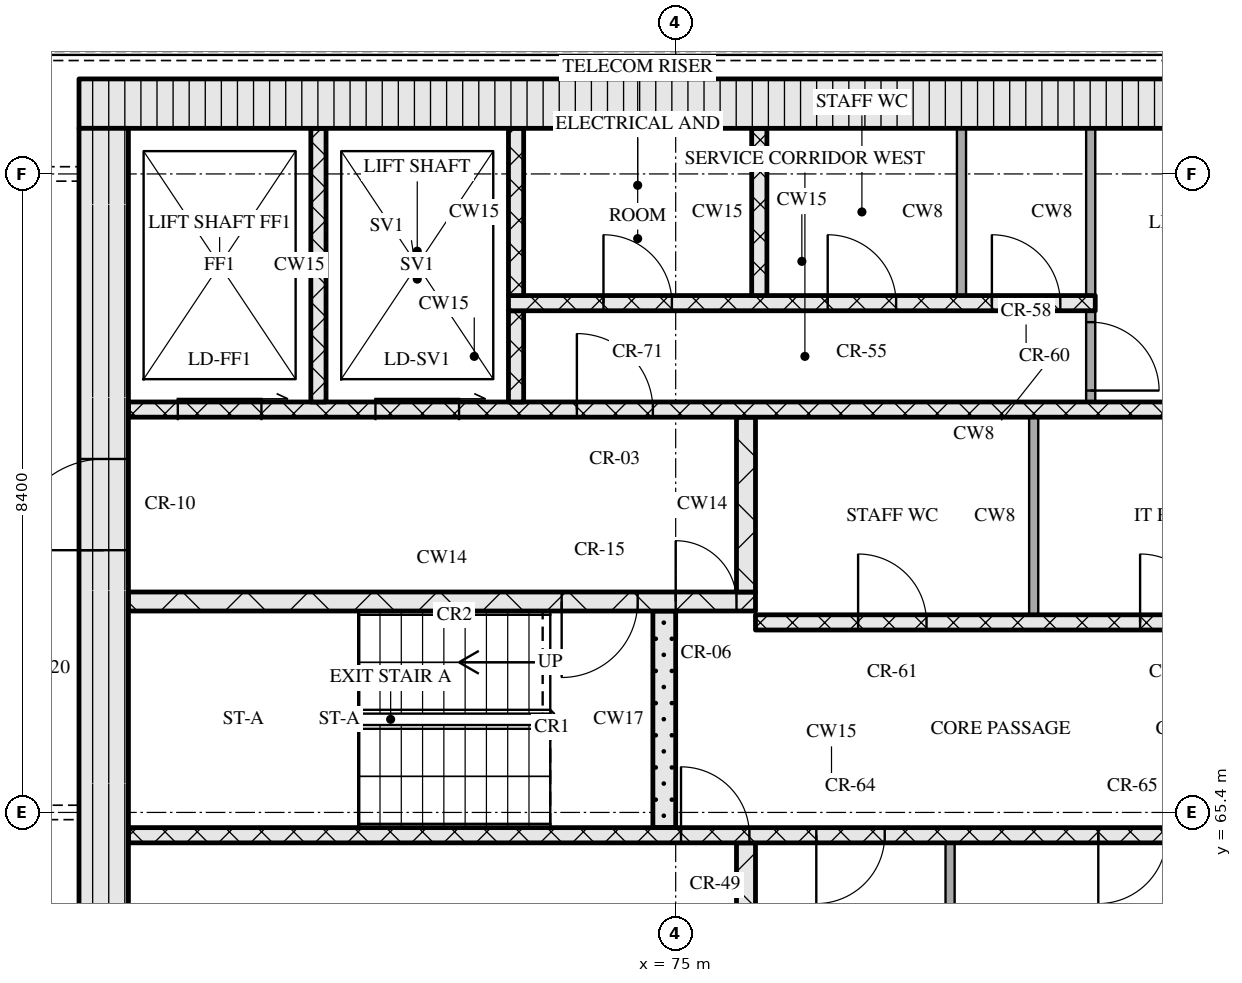
"""IFC4 building model, lengths in metres.
Left out: names, types, materials, properties, quantities, classifications, styles, units other than length and angle.
Written with IfcOpenShell. Run it as: python <this file> out.ifc"""

import sys

from ifc_helpers import new_model, si_unit, direction, frame, frame_2d, origin, place, context, subcontext, project, spatial, rectangle, extrude, element, fill, save


model = new_model("IFC4")
c1 = context("Model", 3, precision=1e-05, world=origin(), true_north=direction((0.0, 1.0)))
c2 = subcontext(c1, "Body", "Model", "MODEL_VIEW")
j1 = project(units=[si_unit("LENGTHUNIT", "METRE"), si_unit("PLANEANGLEUNIT", "RADIAN")], contexts=[c1])
p1 = place(None, origin())
s1 = spatial("IfcSite", under=j1, at=p1, CompositionType="ELEMENT")
p2 = place(p1, origin())
s2 = spatial("IfcBuilding", under=s1, at=p2, CompositionType="ELEMENT")
p3 = place(p2, frame((0.0, 0.0, 230.7)))
s3 = spatial("IfcBuildingStorey", under=s2, at=p3, CompositionType="ELEMENT", Elevation=230.7)
p4 = place(p3, frame((67.15, 74.725, 0.0), z_axis=(0.0, 0.0, 1.0), x_axis=(1.0, 0.0, 0.0)))
e1 = element("IfcWall", 1, at=p4, inside=s3, PredefinedType="SOLIDWALL", context=c2, shape_type="SweptSolid", body=[
    extrude(rectangle(XDim=40.9, YDim=0.65, at=frame_2d((20.45, 0.0))), origin(), (0.0, 0.0, 1.0), 3.32),
])
p5 = place(p3, frame((67.475, 62.4, 0.0), z_axis=(0.0, 0.0, 1.0), x_axis=(0.0, 1.0, 0.0)))
e2 = element("IfcWall", 2, at=p5, inside=s3, PredefinedType="SOLIDWALL", context=c2, shape_type="SweptSolid", body=[
    extrude(rectangle(XDim=12.0, YDim=0.65, at=frame_2d((6.0, 0.0))), origin(), (0.0, 0.0, 1.0), 3.32),
])
p6 = place(p5, frame((6.45, 0.0, 0.0)))
e3 = element("IfcOpeningElement", 3, at=p6, cuts=e2, PredefinedType="OPENING", context=c2, shape_type="SweptSolid", body=[
    extrude(rectangle(XDim=1.2, YDim=2.1, at=frame_2d((0.6, 1.05))), frame((0.0, 0.335, 0.0), z_axis=(0.0, -1.0, 0.0), x_axis=(1.0, 0.0, 0.0)), (0.0, 0.0, 1.0), 0.67),
])
p7 = place(p3, frame((75.925, 62.4, 0.0), z_axis=(0.0, 0.0, 1.0), x_axis=(0.0, 1.0, 0.0)))
e4 = element("IfcWall", 4, at=p7, inside=s3, PredefinedType="SOLIDWALL", context=c2, shape_type="SweptSolid", body=[
    extrude(rectangle(XDim=2.6, YDim=0.25, at=frame_2d((1.3, 0.0))), origin(), (0.0, 0.0, 1.0), 3.32),
])
p8 = place(p3, frame((78.61, 62.4, 0.0), z_axis=(0.0, 0.0, 1.0), x_axis=(0.0, 1.0, 0.0)))
e5 = element("IfcWall", 5, at=p8, inside=s3, PredefinedType="PARTITIONING", context=c2, shape_type="SweptSolid", body=[
    extrude(rectangle(XDim=2.6, YDim=0.12, at=frame_2d((1.3, 0.0))), origin(), (0.0, 0.0, 1.0), 3.32),
])
p9 = place(p3, frame((67.8, 65.1, 0.0), z_axis=(0.0, 0.0, 1.0), x_axis=(1.0, 0.0, 0.0)))
e6 = element("IfcWall", 6, at=p9, inside=s3, PredefinedType="SOLIDWALL", context=c2, shape_type="SweptSolid", body=[
    extrude(rectangle(XDim=18.5, YDim=0.2, at=frame_2d((9.25, 0.0))), origin(), (0.0, 0.0, 1.0), 3.32),
])
p10 = place(p9, frame((7.27, 0.0, 0.0)))
e7 = element("IfcOpeningElement", 7, at=p10, cuts=e6, PredefinedType="OPENING", context=c2, shape_type="SweptSolid", body=[
    extrude(rectangle(XDim=0.9, YDim=2.1, at=frame_2d((0.45, 1.05))), frame((0.0, 0.11, 0.0), z_axis=(0.0, -1.0, 0.0), x_axis=(1.0, 0.0, 0.0)), (0.0, 0.0, 1.0), 0.22),
])
p11 = place(p9, frame((9.05, 0.0, 0.0)))
e8 = element("IfcOpeningElement", 8, at=p11, cuts=e6, PredefinedType="OPENING", context=c2, shape_type="SweptSolid", body=[
    extrude(rectangle(XDim=0.9, YDim=2.1, at=frame_2d((0.45, 1.05))), frame((0.0, 0.11, 0.0), z_axis=(0.0, -1.0, 0.0), x_axis=(1.0, 0.0, 0.0)), (0.0, 0.0, 1.0), 0.22),
])
p12 = place(p9, frame((12.76, 0.0, 0.0)))
e9 = element("IfcOpeningElement", 9, at=p12, cuts=e6, PredefinedType="OPENING", context=c2, shape_type="SweptSolid", body=[
    extrude(rectangle(XDim=0.9, YDim=2.1, at=frame_2d((0.45, 1.05))), frame((0.0, 0.11, 0.0), z_axis=(0.0, -1.0, 0.0), x_axis=(1.0, 0.0, 0.0)), (0.0, 0.0, 1.0), 0.22),
])
p13 = place(p9, frame((16.7, 0.0, 0.0)))
e10 = element("IfcOpeningElement", 10, at=p13, cuts=e6, PredefinedType="OPENING", context=c2, shape_type="SweptSolid", body=[
    extrude(rectangle(XDim=0.9, YDim=2.1, at=frame_2d((0.45, 1.05))), frame((0.0, 0.11, 0.0), z_axis=(0.0, -1.0, 0.0), x_axis=(1.0, 0.0, 0.0)), (0.0, 0.0, 1.0), 0.22),
])
p14 = place(p3, frame((74.85, 65.2, 0.0), z_axis=(0.0, 0.0, 1.0), x_axis=(0.0, 1.0, 0.0)))
e11 = element("IfcWall", 11, at=p14, inside=s3, PredefinedType="SOLIDWALL", context=c2, shape_type="SweptSolid", body=[
    extrude(rectangle(XDim=2.85, YDim=0.3, at=frame_2d((1.425, 0.0))), origin(), (0.0, 0.0, 1.0), 3.32),
])
p15 = place(p3, frame((76.05, 67.9, 0.0), z_axis=(0.0, 0.0, 1.0), x_axis=(1.0, 0.0, 0.0)))
e12 = element("IfcWall", 12, at=p15, inside=s3, PredefinedType="SOLIDWALL", context=c2, shape_type="SweptSolid", body=[
    extrude(rectangle(XDim=23.1, YDim=0.2, at=frame_2d((11.55, 0.0))), origin(), (0.0, 0.0, 1.0), 3.32),
])
p16 = place(p15, frame((1.35, 0.0, 0.0)))
e13 = element("IfcOpeningElement", 13, at=p16, cuts=e12, PredefinedType="OPENING", context=c2, shape_type="SweptSolid", body=[
    extrude(rectangle(XDim=0.9, YDim=2.1, at=frame_2d((0.45, 1.05))), frame((0.0, 0.11, 0.0), z_axis=(0.0, -1.0, 0.0), x_axis=(1.0, 0.0, 0.0)), (0.0, 0.0, 1.0), 0.22),
])
p17 = place(p15, frame((5.06, 0.0, 0.0)))
e14 = element("IfcOpeningElement", 14, at=p17, cuts=e12, PredefinedType="OPENING", context=c2, shape_type="SweptSolid", body=[
    extrude(rectangle(XDim=0.9, YDim=2.1, at=frame_2d((0.45, 1.05))), frame((0.0, 0.11, 0.0), z_axis=(0.0, -1.0, 0.0), x_axis=(1.0, 0.0, 0.0)), (0.0, 0.0, 1.0), 0.22),
])
p18 = place(p15, frame((8.45, 0.0, 0.0)))
e15 = element("IfcOpeningElement", 15, at=p18, cuts=e12, PredefinedType="OPENING", context=c2, shape_type="SweptSolid", body=[
    extrude(rectangle(XDim=0.9, YDim=2.1, at=frame_2d((0.45, 1.05))), frame((0.0, 0.11, 0.0), z_axis=(0.0, -1.0, 0.0), x_axis=(1.0, 0.0, 0.0)), (0.0, 0.0, 1.0), 0.22),
])
p19 = place(p15, frame((10.91, 0.0, 0.0)))
e16 = element("IfcOpeningElement", 16, at=p19, cuts=e12, PredefinedType="OPENING", context=c2, shape_type="SweptSolid", body=[
    extrude(rectangle(XDim=0.9, YDim=2.1, at=frame_2d((0.45, 1.05))), frame((0.0, 0.11, 0.0), z_axis=(0.0, -1.0, 0.0), x_axis=(1.0, 0.0, 0.0)), (0.0, 0.0, 1.0), 0.22),
])
p20 = place(p15, frame((13.55, 0.0, 0.0)))
e17 = element("IfcOpeningElement", 17, at=p20, cuts=e12, PredefinedType="OPENING", context=c2, shape_type="SweptSolid", body=[
    extrude(rectangle(XDim=1.0, YDim=2.1, at=frame_2d((0.5, 1.05))), frame((0.0, 0.11, 0.0), z_axis=(0.0, -1.0, 0.0), x_axis=(1.0, 0.0, 0.0)), (0.0, 0.0, 1.0), 0.22),
])
p21 = place(p15, frame((16.2, 0.0, 0.0)))
e18 = element("IfcOpeningElement", 18, at=p21, cuts=e12, PredefinedType="OPENING", context=c2, shape_type="SweptSolid", body=[
    extrude(rectangle(XDim=1.1, YDim=2.1, at=frame_2d((0.55, 1.05))), frame((0.0, 0.11, 0.0), z_axis=(0.0, -1.0, 0.0), x_axis=(1.0, 0.0, 0.0)), (0.0, 0.0, 1.0), 0.22),
])
p22 = place(p15, frame((18.7, 0.0, 0.0)))
e19 = element("IfcOpeningElement", 19, at=p22, cuts=e12, PredefinedType="OPENING", context=c2, shape_type="SweptSolid", body=[
    extrude(rectangle(XDim=1.1, YDim=2.1, at=frame_2d((0.55, 1.05))), frame((0.0, 0.11, 0.0), z_axis=(0.0, -1.0, 0.0), x_axis=(1.0, 0.0, 0.0)), (0.0, 0.0, 1.0), 0.22),
])
p23 = place(p15, frame((21.2, 0.0, 0.0)))
e20 = element("IfcOpeningElement", 20, at=p23, cuts=e12, PredefinedType="OPENING", context=c2, shape_type="SweptSolid", body=[
    extrude(rectangle(XDim=1.1, YDim=2.1, at=frame_2d((0.55, 1.05))), frame((0.0, 0.11, 0.0), z_axis=(0.0, -1.0, 0.0), x_axis=(1.0, 0.0, 0.0)), (0.0, 0.0, 1.0), 0.22),
])
p24 = place(p3, frame((79.71, 68.0, 0.0), z_axis=(0.0, 0.0, 1.0), x_axis=(0.0, 1.0, 0.0)))
e21 = element("IfcWall", 21, at=p24, inside=s3, PredefinedType="PARTITIONING", context=c2, shape_type="SweptSolid", body=[
    extrude(rectangle(XDim=2.6, YDim=0.12, at=frame_2d((1.3, 0.0))), origin(), (0.0, 0.0, 1.0), 3.32),
])
p25 = place(p3, frame((67.8, 68.175, 0.0), z_axis=(0.0, 0.0, 1.0), x_axis=(1.0, 0.0, 0.0)))
e22 = element("IfcWall", 22, at=p25, inside=s3, PredefinedType="SOLIDWALL", context=c2, shape_type="SweptSolid", body=[
    extrude(rectangle(XDim=8.25, YDim=0.25, at=frame_2d((4.125, 0.0))), origin(), (0.0, 0.0, 1.0), 3.32),
])
p26 = place(p25, frame((5.7, 0.0, 0.0)))
e23 = element("IfcOpeningElement", 23, at=p26, cuts=e22, PredefinedType="OPENING", context=c2, shape_type="SweptSolid", body=[
    extrude(rectangle(XDim=1.0, YDim=2.1, at=frame_2d((0.5, 1.05))), frame((0.0, 0.135, 0.0), z_axis=(0.0, -1.0, 0.0), x_axis=(1.0, 0.0, 0.0)), (0.0, 0.0, 1.0), 0.27),
])
p27 = place(p25, frame((7.2, 0.0, 0.0)))
e24 = element("IfcOpeningElement", 24, at=p27, cuts=e22, PredefinedType="OPENING", context=c2, shape_type="SweptSolid", body=[
    extrude(rectangle(XDim=0.8, YDim=2.1, at=frame_2d((0.4, 1.05))), frame((0.0, 0.135, 0.0), z_axis=(0.0, -1.0, 0.0), x_axis=(1.0, 0.0, 0.0)), (0.0, 0.0, 1.0), 0.27),
])
p28 = place(p3, frame((75.925, 68.3, 0.0), z_axis=(0.0, 0.0, 1.0), x_axis=(0.0, 1.0, 0.0)))
e25 = element("IfcWall", 25, at=p28, inside=s3, PredefinedType="SOLIDWALL", context=c2, shape_type="SweptSolid", body=[
    extrude(rectangle(XDim=2.3, YDim=0.25, at=frame_2d((1.15, 0.0))), origin(), (0.0, 0.0, 1.0), 3.32),
])
p29 = place(p3, frame((67.8, 70.7, 0.0), z_axis=(0.0, 0.0, 1.0), x_axis=(1.0, 0.0, 0.0)))
e26 = element("IfcWall", 26, at=p29, inside=s3, PredefinedType="SOLIDWALL", context=c2, shape_type="SweptSolid", body=[
    extrude(rectangle(XDim=39.6, YDim=0.2, at=frame_2d((19.8, 0.0))), origin(), (0.0, 0.0, 1.0), 3.32),
])
p30 = place(p29, frame((0.65, 0.0, 0.0)))
e27 = element("IfcOpeningElement", 27, at=p30, cuts=e26, PredefinedType="OPENING", context=c2, shape_type="SweptSolid", body=[
    extrude(rectangle(XDim=1.1, YDim=2.1, at=frame_2d((0.55, 1.05))), frame((0.0, 0.11, 0.0), z_axis=(0.0, -1.0, 0.0), x_axis=(1.0, 0.0, 0.0)), (0.0, 0.0, 1.0), 0.22),
])
p31 = place(p29, frame((3.25, 0.0, 0.0)))
e28 = element("IfcOpeningElement", 28, at=p31, cuts=e26, PredefinedType="OPENING", context=c2, shape_type="SweptSolid", body=[
    extrude(rectangle(XDim=1.1, YDim=2.1, at=frame_2d((0.55, 1.05))), frame((0.0, 0.11, 0.0), z_axis=(0.0, -1.0, 0.0), x_axis=(1.0, 0.0, 0.0)), (0.0, 0.0, 1.0), 0.22),
])
p32 = place(p29, frame((5.9, 0.0, 0.0)))
e29 = element("IfcOpeningElement", 29, at=p32, cuts=e26, PredefinedType="OPENING", context=c2, shape_type="SweptSolid", body=[
    extrude(rectangle(XDim=1.0, YDim=2.1, at=frame_2d((0.5, 1.05))), frame((0.0, 0.11, 0.0), z_axis=(0.0, -1.0, 0.0), x_axis=(1.0, 0.0, 0.0)), (0.0, 0.0, 1.0), 0.22),
])
p33 = place(p29, frame((21.7, 0.0, 0.0)))
e30 = element("IfcOpeningElement", 30, at=p33, cuts=e26, PredefinedType="OPENING", context=c2, shape_type="SweptSolid", body=[
    extrude(rectangle(XDim=1.0, YDim=2.1, at=frame_2d((0.5, 1.05))), frame((0.0, 0.11, 0.0), z_axis=(0.0, -1.0, 0.0), x_axis=(1.0, 0.0, 0.0)), (0.0, 0.0, 1.0), 0.22),
])
p34 = place(p29, frame((32.7, 0.0, 0.0)))
e31 = element("IfcOpeningElement", 31, at=p34, cuts=e26, PredefinedType="OPENING", context=c2, shape_type="SweptSolid", body=[
    extrude(rectangle(XDim=1.0, YDim=2.1, at=frame_2d((0.5, 1.05))), frame((0.0, 0.11, 0.0), z_axis=(0.0, -1.0, 0.0), x_axis=(1.0, 0.0, 0.0)), (0.0, 0.0, 1.0), 0.22),
])
p35 = place(p29, frame((35.25, 0.0, 0.0)))
e32 = element("IfcOpeningElement", 32, at=p35, cuts=e26, PredefinedType="OPENING", context=c2, shape_type="SweptSolid", body=[
    extrude(rectangle(XDim=1.1, YDim=2.1, at=frame_2d((0.55, 1.05))), frame((0.0, 0.11, 0.0), z_axis=(0.0, -1.0, 0.0), x_axis=(1.0, 0.0, 0.0)), (0.0, 0.0, 1.0), 0.22),
])
p36 = place(p29, frame((37.85, 0.0, 0.0)))
e33 = element("IfcOpeningElement", 33, at=p36, cuts=e26, PredefinedType="OPENING", context=c2, shape_type="SweptSolid", body=[
    extrude(rectangle(XDim=1.1, YDim=2.1, at=frame_2d((0.55, 1.05))), frame((0.0, 0.11, 0.0), z_axis=(0.0, -1.0, 0.0), x_axis=(1.0, 0.0, 0.0)), (0.0, 0.0, 1.0), 0.22),
])
p37 = place(p3, frame((70.3, 70.8, 0.0), z_axis=(0.0, 0.0, 1.0), x_axis=(0.0, 1.0, 0.0)))
e34 = element("IfcWall", 34, at=p37, inside=s3, PredefinedType="SOLIDWALL", context=c2, shape_type="SweptSolid", body=[
    extrude(rectangle(XDim=3.6, YDim=0.2, at=frame_2d((1.8, 0.0))), origin(), (0.0, 0.0, 1.0), 3.32),
])
p38 = place(p3, frame((72.9, 70.8, 0.0), z_axis=(0.0, 0.0, 1.0), x_axis=(0.0, 1.0, 0.0)))
e35 = element("IfcWall", 35, at=p38, inside=s3, PredefinedType="SOLIDWALL", context=c2, shape_type="SweptSolid", body=[
    extrude(rectangle(XDim=1.2, YDim=0.2, at=frame_2d((0.6, 0.0))), origin(), (0.0, 0.0, 1.0), 3.32),
])
p39 = place(p3, frame((80.46, 70.8, 0.0), z_axis=(0.0, 0.0, 1.0), x_axis=(0.0, 1.0, 0.0)))
e36 = element("IfcWall", 36, at=p39, inside=s3, PredefinedType="PARTITIONING", context=c2, shape_type="SweptSolid", body=[
    extrude(rectangle(XDim=1.2, YDim=0.12, at=frame_2d((0.6, 0.0))), origin(), (0.0, 0.0, 1.0), 3.32),
])
p40 = place(p39, frame((0.15, 0.0, 0.0)))
e37 = element("IfcOpeningElement", 37, at=p40, cuts=e36, PredefinedType="OPENING", context=c2, shape_type="SweptSolid", body=[
    extrude(rectangle(XDim=0.9, YDim=2.1, at=frame_2d((0.45, 1.05))), frame((0.0, 0.07, 0.0), z_axis=(0.0, -1.0, 0.0), x_axis=(1.0, 0.0, 0.0)), (0.0, 0.0, 1.0), 0.14),
])
p41 = place(p3, frame((72.8, 72.1, 0.0), z_axis=(0.0, 0.0, 1.0), x_axis=(1.0, 0.0, 0.0)))
e38 = element("IfcWall", 38, at=p41, inside=s3, PredefinedType="SOLIDWALL", context=c2, shape_type="SweptSolid", body=[
    extrude(rectangle(XDim=7.72, YDim=0.2, at=frame_2d((3.86, 0.0))), origin(), (0.0, 0.0, 1.0), 3.32),
])
p42 = place(p41, frame((1.25, 0.0, 0.0)))
e39 = element("IfcOpeningElement", 39, at=p42, cuts=e38, PredefinedType="OPENING", context=c2, shape_type="SweptSolid", body=[
    extrude(rectangle(XDim=0.9, YDim=2.1, at=frame_2d((0.45, 1.05))), frame((0.0, 0.11, 0.0), z_axis=(0.0, -1.0, 0.0), x_axis=(1.0, 0.0, 0.0)), (0.0, 0.0, 1.0), 0.22),
])
p43 = place(p41, frame((4.2, 0.0, 0.0)))
e40 = element("IfcOpeningElement", 40, at=p43, cuts=e38, PredefinedType="OPENING", context=c2, shape_type="SweptSolid", body=[
    extrude(rectangle(XDim=0.9, YDim=2.1, at=frame_2d((0.45, 1.05))), frame((0.0, 0.11, 0.0), z_axis=(0.0, -1.0, 0.0), x_axis=(1.0, 0.0, 0.0)), (0.0, 0.0, 1.0), 0.22),
])
p44 = place(p41, frame((6.36, 0.0, 0.0)))
e41 = element("IfcOpeningElement", 41, at=p44, cuts=e38, PredefinedType="OPENING", context=c2, shape_type="SweptSolid", body=[
    extrude(rectangle(XDim=0.9, YDim=2.1, at=frame_2d((0.45, 1.05))), frame((0.0, 0.11, 0.0), z_axis=(0.0, -1.0, 0.0), x_axis=(1.0, 0.0, 0.0)), (0.0, 0.0, 1.0), 0.22),
])
for number, where, z_axis, x_axis in (
    (42, (72.9, 72.2, 0.0), (0.0, 0.0, 1.0), (0.0, 1.0, 0.0)),
    (43, (76.1, 72.2, 0.0), (0.0, 0.0, 1.0), (0.0, 1.0, 0.0)),
):
    element("IfcWall", number, at=place(p3, frame(where, z_axis=z_axis, x_axis=x_axis)), inside=s3, PredefinedType="SOLIDWALL", context=c2, shape_type="SweptSolid", body=[
        extrude(rectangle(XDim=2.2, YDim=0.2, at=frame_2d((1.1, 0.0))), origin(), (0.0, 0.0, 1.0), 3.32),
    ])
for number, where, z_axis, x_axis in (
    (44, (78.76, 72.2, 0.0), (0.0, 0.0, 1.0), (0.0, 1.0, 0.0)),
    (45, (80.46, 72.2, 0.0), (0.0, 0.0, 1.0), (0.0, 1.0, 0.0)),
):
    element("IfcWall", number, at=place(p3, frame(where, z_axis=z_axis, x_axis=x_axis)), inside=s3, PredefinedType="PARTITIONING", context=c2, shape_type="SweptSolid", body=[
        extrude(rectangle(XDim=2.2, YDim=0.12, at=frame_2d((1.1, 0.0))), origin(), (0.0, 0.0, 1.0), 3.32),
    ])
p45 = place(p10, origin())
e46 = element("IfcDoor", 46, at=p45, inside=s3, OperationType="SINGLE_SWING_LEFT", PredefinedType="DOOR", context=c2, shape_type="SweptSolid", body=[
    extrude(rectangle(XDim=0.9, YDim=2.1, at=frame_2d((0.45, 1.05))), frame((0.0, 0.025, 0.0), z_axis=(0.0, -1.0, 0.0), x_axis=(1.0, 0.0, 0.0)), (0.0, 0.0, 1.0), 0.05),
])
fill(e7, e46)
p46 = place(p11, origin())
e47 = element("IfcDoor", 47, at=p46, inside=s3, OperationType="SINGLE_SWING_RIGHT", PredefinedType="DOOR", context=c2, shape_type="SweptSolid", body=[
    extrude(rectangle(XDim=0.9, YDim=2.1, at=frame_2d((0.45, 1.05))), frame((0.0, 0.025, 0.0), z_axis=(0.0, -1.0, 0.0), x_axis=(1.0, 0.0, 0.0)), (0.0, 0.0, 1.0), 0.05),
])
fill(e8, e47)
p47 = place(p12, origin())
e48 = element("IfcDoor", 48, at=p47, inside=s3, OperationType="SINGLE_SWING_RIGHT", PredefinedType="DOOR", context=c2, shape_type="SweptSolid", body=[
    extrude(rectangle(XDim=0.9, YDim=2.1, at=frame_2d((0.45, 1.05))), frame((0.0, 0.025, 0.0), z_axis=(0.0, -1.0, 0.0), x_axis=(1.0, 0.0, 0.0)), (0.0, 0.0, 1.0), 0.05),
])
fill(e9, e48)
p48 = place(p16, origin())
e49 = element("IfcDoor", 49, at=p48, inside=s3, OperationType="SINGLE_SWING_LEFT", PredefinedType="DOOR", context=c2, shape_type="SweptSolid", body=[
    extrude(rectangle(XDim=0.9, YDim=2.1, at=frame_2d((0.45, 1.05))), frame((0.0, 0.025, 0.0), z_axis=(0.0, -1.0, 0.0), x_axis=(1.0, 0.0, 0.0)), (0.0, 0.0, 1.0), 0.05),
])
fill(e13, e49)
p49 = place(p17, origin())
e50 = element("IfcDoor", 50, at=p49, inside=s3, OperationType="SINGLE_SWING_LEFT", PredefinedType="DOOR", context=c2, shape_type="SweptSolid", body=[
    extrude(rectangle(XDim=0.9, YDim=2.1, at=frame_2d((0.45, 1.05))), frame((0.0, 0.025, 0.0), z_axis=(0.0, -1.0, 0.0), x_axis=(1.0, 0.0, 0.0)), (0.0, 0.0, 1.0), 0.05),
])
fill(e14, e50)
p50 = place(p26, origin())
e51 = element("IfcDoor", 51, at=p50, inside=s3, OperationType="SINGLE_SWING_RIGHT", PredefinedType="DOOR", context=c2, shape_type="SweptSolid", body=[
    extrude(rectangle(XDim=1.0, YDim=2.1, at=frame_2d((0.5, 1.05))), frame((0.0, 0.025, 0.0), z_axis=(0.0, -1.0, 0.0), x_axis=(1.0, 0.0, 0.0)), (0.0, 0.0, 1.0), 0.05),
])
fill(e23, e51)
p51 = place(p27, origin())
e52 = element("IfcDoor", 52, at=p51, inside=s3, OperationType="SINGLE_SWING_LEFT", PredefinedType="DOOR", context=c2, shape_type="SweptSolid", body=[
    extrude(rectangle(XDim=0.8, YDim=2.1, at=frame_2d((0.4, 1.05))), frame((0.0, 0.025, 0.0), z_axis=(0.0, -1.0, 0.0), x_axis=(1.0, 0.0, 0.0)), (0.0, 0.0, 1.0), 0.05),
])
fill(e24, e52)
p52 = place(p6, origin())
e53 = element("IfcDoor", 53, at=p52, inside=s3, OperationType="SINGLE_SWING_LEFT", PredefinedType="DOOR", context=c2, shape_type="SweptSolid", body=[
    extrude(rectangle(XDim=1.2, YDim=2.1, at=frame_2d((0.6, 1.05))), frame((0.0, 0.025, 0.0), z_axis=(0.0, -1.0, 0.0), x_axis=(1.0, 0.0, 0.0)), (0.0, 0.0, 1.0), 0.05),
])
fill(e3, e53)
p53 = place(p30, origin())
e54 = element("IfcDoor", 54, at=p53, inside=s3, OperationType="SLIDING_TO_RIGHT", PredefinedType="DOOR", context=c2, shape_type="SweptSolid", body=[
    extrude(rectangle(XDim=1.1, YDim=2.1, at=frame_2d((0.55, 1.05))), frame((0.0, 0.025, 0.0), z_axis=(0.0, -1.0, 0.0), x_axis=(1.0, 0.0, 0.0)), (0.0, 0.0, 1.0), 0.05),
])
fill(e27, e54)
p54 = place(p31, origin())
e55 = element("IfcDoor", 55, at=p54, inside=s3, OperationType="SLIDING_TO_RIGHT", PredefinedType="DOOR", context=c2, shape_type="SweptSolid", body=[
    extrude(rectangle(XDim=1.1, YDim=2.1, at=frame_2d((0.55, 1.05))), frame((0.0, 0.025, 0.0), z_axis=(0.0, -1.0, 0.0), x_axis=(1.0, 0.0, 0.0)), (0.0, 0.0, 1.0), 0.05),
])
fill(e28, e55)
p55 = place(p32, origin())
e56 = element("IfcDoor", 56, at=p55, inside=s3, OperationType="SINGLE_SWING_LEFT", PredefinedType="DOOR", context=c2, shape_type="SweptSolid", body=[
    extrude(rectangle(XDim=1.0, YDim=2.1, at=frame_2d((0.5, 1.05))), frame((0.0, 0.025, 0.0), z_axis=(0.0, -1.0, 0.0), x_axis=(1.0, 0.0, 0.0)), (0.0, 0.0, 1.0), 0.05),
])
fill(e29, e56)
p56 = place(p40, origin())
e57 = element("IfcDoor", 57, at=p56, inside=s3, OperationType="SINGLE_SWING_RIGHT", PredefinedType="DOOR", context=c2, shape_type="SweptSolid", body=[
    extrude(rectangle(XDim=0.9, YDim=2.1, at=frame_2d((0.45, 1.05))), frame((0.0, 0.025, 0.0), z_axis=(0.0, -1.0, 0.0), x_axis=(1.0, 0.0, 0.0)), (0.0, 0.0, 1.0), 0.05),
])
fill(e37, e57)
p57 = place(p42, origin())
e58 = element("IfcDoor", 58, at=p57, inside=s3, OperationType="SINGLE_SWING_LEFT", PredefinedType="DOOR", context=c2, shape_type="SweptSolid", body=[
    extrude(rectangle(XDim=0.9, YDim=2.1, at=frame_2d((0.45, 1.05))), frame((0.0, 0.025, 0.0), z_axis=(0.0, -1.0, 0.0), x_axis=(1.0, 0.0, 0.0)), (0.0, 0.0, 1.0), 0.05),
])
fill(e39, e58)
p58 = place(p43, origin())
e59 = element("IfcDoor", 59, at=p58, inside=s3, OperationType="SINGLE_SWING_LEFT", PredefinedType="DOOR", context=c2, shape_type="SweptSolid", body=[
    extrude(rectangle(XDim=0.9, YDim=2.1, at=frame_2d((0.45, 1.05))), frame((0.0, 0.025, 0.0), z_axis=(0.0, -1.0, 0.0), x_axis=(1.0, 0.0, 0.0)), (0.0, 0.0, 1.0), 0.05),
])
fill(e40, e59)
p59 = place(p44, origin())
e60 = element("IfcDoor", 60, at=p59, inside=s3, OperationType="SINGLE_SWING_LEFT", PredefinedType="DOOR", context=c2, shape_type="SweptSolid", body=[
    extrude(rectangle(XDim=0.9, YDim=2.1, at=frame_2d((0.45, 1.05))), frame((0.0, 0.025, 0.0), z_axis=(0.0, -1.0, 0.0), x_axis=(1.0, 0.0, 0.0)), (0.0, 0.0, 1.0), 0.05),
])
fill(e41, e60)
save(model, sys.argv[1])
